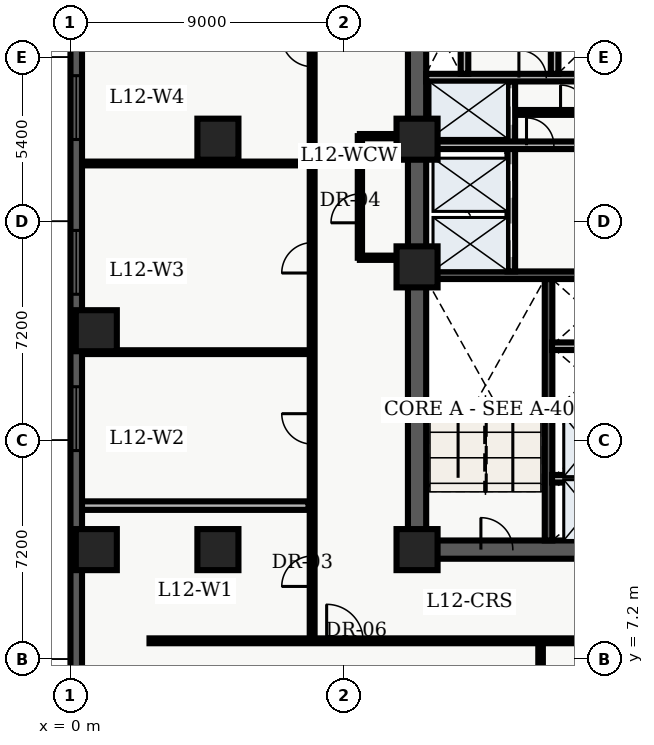
"""IFC4 building model, lengths in metres.
Left out: names, types, materials, properties, quantities, classifications, styles, units other than length and angle.
Written with IfcOpenShell. Run it as: python <this file> out.ifc"""

import sys

from ifc_helpers import new_model, entity, si_unit, converted_unit, direction, frame, origin_with_axes, origin_2d_with_axis, place, context, subcontext, project, spatial, polyline, rectangle, outline, extrude, element, fill, save


model = new_model("IFC4")
c1 = context("Model", 3, precision=1e-05, world=origin_with_axes(), true_north=direction((0.0, 1.0)))
c2 = subcontext(c1, "Body", "Model", "MODEL_VIEW")
j1 = project(units=[si_unit("LENGTHUNIT", "METRE"), converted_unit("PLANEANGLEUNIT", "DEGREE", entity("IfcPlaneAngleMeasure", 0.017), si_unit("PLANEANGLEUNIT", "RADIAN"), dimensions=[0, 0, 0, 0, 0, 0, 0])], contexts=[c1])
p1 = place(None, origin_with_axes())
s1 = spatial("IfcSite", under=j1, at=p1, CompositionType="ELEMENT")
p2 = place(p1, origin_with_axes())
s2 = spatial("IfcBuilding", under=s1, at=p2, CompositionType="ELEMENT")
p3 = place(p2, frame((0.0, 0.0, 52.2), z_axis=(0.0, 0.0, 1.0), x_axis=(1.0, 0.0, 0.0)))
s3 = spatial("IfcBuildingStorey", under=s2, at=p3, CompositionType="ELEMENT", Elevation=52.2)
p4 = place(p3, frame((11.4, 10.8, 0.0), z_axis=(0.0, 0.0, 1.0), x_axis=(0.0, 1.0, 0.0)))
e1 = element("IfcWall", 1, at=p4, inside=s3, PredefinedType="SHEAR", context=c2, shape_type="SweptSolid", body=[
    extrude(outline(polyline([(0.0, -0.3), (27.0, -0.3), (27.0, 0.3), (0.0, 0.3), (0.0, -0.3)])), origin_with_axes(), (0.0, 0.0, 1.0), 3.66),
])
p5 = place(p3, frame((11.4, 10.8, 0.0), z_axis=(0.0, 0.0, 1.0), x_axis=(1.0, 0.0, 0.0)))
e2 = element("IfcWall", 2, at=p5, inside=s3, PredefinedType="SHEAR", context=c2, shape_type="SweptSolid", body=[
    extrude(outline(polyline([(0.0, -0.3), (7.2, -0.3), (7.2, 0.3), (0.0, 0.3), (0.0, -0.3)])), origin_with_axes(), (0.0, 0.0, 1.0), 3.66),
])
p6 = place(p5, frame((2.625, 0.0, 0.0), z_axis=(0.0, 0.0, 1.0), x_axis=(1.0, 0.0, 0.0)))
e3 = element("IfcOpeningElement", 3, at=p6, cuts=e2, PredefinedType="OPENING", context=c2, shape_type="SweptSolid", body=[
    extrude(rectangle(XDim=1.05, YDim=0.62, at=origin_2d_with_axis()), origin_with_axes(), (0.0, 0.0, 1.0), 2.15),
])
p7 = place(p3, frame((15.725, 11.1, 0.0), z_axis=(0.0, 0.0, 1.0), x_axis=(0.0, 1.0, 0.0)))
e4 = element("IfcWall", 4, at=p7, inside=s3, PredefinedType="SHEAR", context=c2, shape_type="SweptSolid", body=[
    extrude(outline(polyline([(0.0, -0.125), (8.6, -0.125), (8.6, 0.125), (0.0, 0.125), (0.0, -0.125)])), origin_with_axes(), (0.0, 0.0, 1.0), 3.66),
])
p8 = place(p3, frame((11.7, 19.825, 0.0), z_axis=(0.0, 0.0, 1.0), x_axis=(1.0, 0.0, 0.0)))
e5 = element("IfcWall", 5, at=p8, inside=s3, PredefinedType="SHEAR", context=c2, shape_type="SweptSolid", body=[
    extrude(outline(polyline([(0.0, -0.125), (6.6, -0.125), (6.6, 0.125), (0.0, 0.125), (0.0, -0.125)])), origin_with_axes(), (0.0, 0.0, 1.0), 3.66),
])
p9 = place(p3, frame((14.5, 19.95, 0.0), z_axis=(0.0, 0.0, 1.0), x_axis=(0.0, 1.0, 0.0)))
e6 = element("IfcWall", 6, at=p9, inside=s3, PredefinedType="SOLIDWALL", context=c2, shape_type="SweptSolid", body=[
    extrude(outline(polyline([(0.0, -0.125), (6.25, -0.125), (6.25, 0.125), (0.0, 0.125), (0.0, -0.125)])), origin_with_axes(), (0.0, 0.0, 1.0), 2.7),
])
p10 = place(p9, frame((1.025, 0.0, 0.0), z_axis=(0.0, 0.0, 1.0), x_axis=(1.0, 0.0, 0.0)))
e7 = element("IfcOpeningElement", 7, at=p10, cuts=e6, PredefinedType="OPENING", context=c2, shape_type="SweptSolid", body=[
    extrude(rectangle(XDim=1.1, YDim=0.27, at=origin_2d_with_axis()), origin_with_axes(), (0.0, 0.0, 1.0), 2.15),
])
p11 = place(p9, frame((2.975, 0.0, 0.0), z_axis=(0.0, 0.0, 1.0), x_axis=(1.0, 0.0, 0.0)))
e8 = element("IfcOpeningElement", 8, at=p11, cuts=e6, PredefinedType="OPENING", context=c2, shape_type="SweptSolid", body=[
    extrude(rectangle(XDim=1.1, YDim=0.27, at=origin_2d_with_axis()), origin_with_axes(), (0.0, 0.0, 1.0), 2.15),
])
p12 = place(p9, frame((5.425, 0.0, 0.0), z_axis=(0.0, 0.0, 1.0), x_axis=(1.0, 0.0, 0.0)))
e9 = element("IfcOpeningElement", 9, at=p12, cuts=e6, PredefinedType="OPENING", context=c2, shape_type="SweptSolid", body=[
    extrude(rectangle(XDim=1.2, YDim=0.27, at=origin_2d_with_axis()), origin_with_axes(), (0.0, 0.0, 1.0), 2.15),
])
p13 = place(p3, frame((11.7, 24.1, 0.0), z_axis=(0.0, 0.0, 1.0), x_axis=(1.0, 0.0, 0.0)))
e10 = element("IfcWall", 10, at=p13, inside=s3, PredefinedType="SOLIDWALL", context=c2, shape_type="SweptSolid", body=[
    extrude(outline(polyline([(0.0, -0.125), (6.6, -0.125), (6.6, 0.125), (0.0, 0.125), (0.0, -0.125)])), origin_with_axes(), (0.0, 0.0, 1.0), 2.7),
])
p14 = place(p13, frame((3.75, 0.0, 0.0), z_axis=(0.0, 0.0, 1.0), x_axis=(1.0, 0.0, 0.0)))
e11 = element("IfcOpeningElement", 11, at=p14, cuts=e10, PredefinedType="OPENING", context=c2, shape_type="SweptSolid", body=[
    extrude(rectangle(XDim=0.9, YDim=0.27, at=origin_2d_with_axis()), origin_with_axes(), (0.0, 0.0, 1.0), 2.15),
])
p15 = place(p3, frame((11.7, 26.325, 0.0), z_axis=(0.0, 0.0, 1.0), x_axis=(1.0, 0.0, 0.0)))
e12 = element("IfcWall", 12, at=p15, inside=s3, PredefinedType="SOLIDWALL", context=c2, shape_type="SweptSolid", body=[
    extrude(outline(polyline([(0.0, -0.125), (6.6, -0.125), (6.6, 0.125), (0.0, 0.125), (0.0, -0.125)])), origin_with_axes(), (0.0, 0.0, 1.0), 2.7),
])
p16 = place(p15, frame((3.5, 0.0, 0.0), z_axis=(0.0, 0.0, 1.0), x_axis=(1.0, 0.0, 0.0)))
e13 = element("IfcOpeningElement", 13, at=p16, cuts=e12, PredefinedType="OPENING", context=c2, shape_type="SweptSolid", body=[
    extrude(rectangle(XDim=0.9, YDim=0.27, at=origin_2d_with_axis()), origin_with_axes(), (0.0, 0.0, 1.0), 2.15),
])
for number, where, z_axis, x_axis in (
    (14, (12.96, 26.45, 0.0), (0.0, 0.0, 1.0), (0.0, 1.0, 0.0)),
    (15, (15.925, 26.45, 0.0), (0.0, 0.0, 1.0), (0.0, 1.0, 0.0)),
):
    element("IfcWall", number, at=place(p3, frame(where, z_axis=z_axis, x_axis=x_axis)), inside=s3, PredefinedType="SOLIDWALL", context=c2, shape_type="SweptSolid", body=[
        extrude(outline(polyline([(0.0, -0.125), (2.2, -0.125), (2.2, 0.125), (0.0, 0.125), (0.0, -0.125)])), origin_with_axes(), (0.0, 0.0, 1.0), 2.7),
    ])
for number, where, z_axis, x_axis in (
    (16, (11.4, 10.8, 0.0), (0.0, 0.0, 1.0), (1.0, 0.0, 0.0)),
    (17, (11.4, 20.1, 0.0), (0.0, 0.0, 1.0), (1.0, 0.0, 0.0)),
    (18, (11.4, 24.3, 0.0), (0.0, 0.0, 1.0), (1.0, 0.0, 0.0)),
    (19, (4.85, 10.8, 0.0), (0.0, 0.0, 1.0), (1.0, 0.0, 0.0)),
    (20, (4.85, 24.3, 0.0), (0.0, 0.0, 1.0), (1.0, 0.0, 0.0)),
    (21, (0.85, 10.8, 0.0), (0.0, 0.0, 1.0), (1.0, 0.0, 0.0)),
    (22, (0.85, 18.0, 0.0), (0.0, 0.0, 1.0), (1.0, 0.0, 0.0)),
):
    element("IfcColumn", number, at=place(p3, frame(where, z_axis=z_axis, x_axis=x_axis)), inside=s3, PredefinedType="COLUMN", context=c2, shape_type="SweptSolid", body=[
        extrude(rectangle(XDim=1.35, YDim=1.35, at=origin_2d_with_axis()), origin_with_axes(), (0.0, 0.0, 1.0), 3.9),
    ])
p17 = place(p3, frame((14.62, 25.18, 0.0), z_axis=(0.0, 0.0, 1.0), x_axis=(1.0, 0.0, 0.0)))
e23 = element("IfcWall", 23, at=p17, inside=s3, PredefinedType="PARTITIONING", context=c2, shape_type="SweptSolid", body=[
    extrude(outline(polyline([(0.0, -0.08), (3.68, -0.08), (3.68, 0.08), (0.0, 0.08), (0.0, -0.08)])), origin_with_axes(), (0.0, 0.0, 1.0), 2.7),
])
p18 = place(p17, frame((1.95, 0.0, 0.0), z_axis=(0.0, 0.0, 1.0), x_axis=(1.0, 0.0, 0.0)))
e24 = element("IfcOpeningElement", 24, at=p18, cuts=e23, PredefinedType="OPENING", context=c2, shape_type="SweptSolid", body=[
    extrude(rectangle(XDim=0.9, YDim=0.18, at=origin_2d_with_axis()), origin_with_axes(), (0.0, 0.0, 1.0), 2.15),
])
for number, where, z_axis, x_axis in (
    (25, (15.84, 13.13, 0.0), (0.0, 0.0, 1.0), (1.0, 0.0, 0.0)),
    (26, (15.84, 15.29, 0.0), (0.0, 0.0, 1.0), (1.0, 0.0, 0.0)),
    (27, (15.84, 17.49, 0.0), (0.0, 0.0, 1.0), (1.0, 0.0, 0.0)),
):
    element("IfcWall", number, at=place(p3, frame(where, z_axis=z_axis, x_axis=x_axis)), inside=s3, PredefinedType="SOLIDWALL", context=c2, shape_type="SweptSolid", body=[
        extrude(outline(polyline([(0.0, -0.125), (2.46, -0.125), (2.46, 0.125), (0.0, 0.125), (0.0, -0.125)])), origin_with_axes(), (0.0, 0.0, 1.0), 2.7),
    ])
p19 = place(p3, frame((9.52, 20.4, 0.0), z_axis=(0.0, 0.0, 1.0), x_axis=(0.0, 1.0, 0.0)))
e28 = element("IfcWall", 28, at=p19, inside=s3, PredefinedType="PARTITIONING", context=c2, shape_type="SweptSolid", body=[
    extrude(outline(polyline([(0.0, -0.07), (4.0, -0.07), (4.0, 0.07), (0.0, 0.07), (0.0, -0.07)])), origin_with_axes(), (0.0, 0.0, 1.0), 2.7),
])
p20 = place(p19, frame((1.625, 0.0, 0.0), z_axis=(0.0, 0.0, 1.0), x_axis=(1.0, 0.0, 0.0)))
e29 = element("IfcOpeningElement", 29, at=p20, cuts=e28, PredefinedType="OPENING", context=c2, shape_type="SweptSolid", body=[
    extrude(rectangle(XDim=0.95, YDim=0.16, at=origin_2d_with_axis()), origin_with_axes(), (0.0, 0.0, 1.0), 2.15),
])
for number, where, z_axis, x_axis in (
    (30, (9.52, 20.4, 0.0), (0.0, 0.0, 1.0), (1.0, 0.0, 0.0)),
    (31, (9.52, 24.4, 0.0), (0.0, 0.0, 1.0), (1.0, 0.0, 0.0)),
):
    element("IfcWall", number, at=place(p3, frame(where, z_axis=z_axis, x_axis=x_axis)), inside=s3, PredefinedType="PARTITIONING", context=c2, shape_type="SweptSolid", body=[
        extrude(outline(polyline([(0.0, -0.07), (1.58, -0.07), (1.58, 0.07), (0.0, 0.07), (0.0, -0.07)])), origin_with_axes(), (0.0, 0.0, 1.0), 2.7),
    ])
p21 = place(p3, frame((2.6, 7.8, 0.0), z_axis=(0.0, 0.0, 1.0), x_axis=(1.0, 0.0, 0.0)))
e32 = element("IfcWall", 32, at=p21, inside=s3, PredefinedType="PARTITIONING", context=c2, shape_type="SweptSolid", body=[
    extrude(outline(polyline([(0.0, -0.08), (18.55, -0.08), (18.55, 0.08), (0.0, 0.08), (0.0, -0.08)])), origin_with_axes(), (0.0, 0.0, 1.0), 2.7),
])
p22 = place(p21, frame((6.426, 0.0, 0.0), z_axis=(0.0, 0.0, 1.0), x_axis=(1.0, 0.0, 0.0)))
e33 = element("IfcOpeningElement", 33, at=p22, cuts=e32, PredefinedType="OPENING", context=c2, shape_type="SweptSolid", body=[
    extrude(rectangle(XDim=1.2, YDim=0.18, at=origin_2d_with_axis()), origin_with_axes(), (0.0, 0.0, 1.0), 2.2),
])
p23 = place(p21, frame((15.681, 0.0, 0.0), z_axis=(0.0, 0.0, 1.0), x_axis=(1.0, 0.0, 0.0)))
e34 = element("IfcOpeningElement", 34, at=p23, cuts=e32, PredefinedType="OPENING", context=c2, shape_type="SweptSolid", body=[
    extrude(rectangle(XDim=1.0, YDim=0.18, at=origin_2d_with_axis()), origin_with_axes(), (0.0, 0.0, 1.0), 2.15),
])
p24 = place(p3, frame((7.95, 7.8, 0.0), z_axis=(0.0, 0.0, 1.0), x_axis=(0.0, 1.0, 0.0)))
e35 = element("IfcWall", 35, at=p24, inside=s3, PredefinedType="PARTITIONING", context=c2, shape_type="SweptSolid", body=[
    extrude(outline(polyline([(0.0, -0.08), (32.7, -0.08), (32.7, 0.08), (0.0, 0.08), (0.0, -0.08)])), origin_with_axes(), (0.0, 0.0, 1.0), 2.7),
])
p25 = place(p24, frame((2.288, 0.0, 0.0), z_axis=(0.0, 0.0, 1.0), x_axis=(1.0, 0.0, 0.0)))
e36 = element("IfcOpeningElement", 36, at=p25, cuts=e35, PredefinedType="OPENING", context=c2, shape_type="SweptSolid", body=[
    extrude(rectangle(XDim=1.0, YDim=0.18, at=origin_2d_with_axis()), origin_with_axes(), (0.0, 0.0, 1.0), 2.15),
])
p26 = place(p24, frame((6.971, 0.0, 0.0), z_axis=(0.0, 0.0, 1.0), x_axis=(1.0, 0.0, 0.0)))
e37 = element("IfcOpeningElement", 37, at=p26, cuts=e35, PredefinedType="OPENING", context=c2, shape_type="SweptSolid", body=[
    extrude(rectangle(XDim=1.0, YDim=0.18, at=origin_2d_with_axis()), origin_with_axes(), (0.0, 0.0, 1.0), 2.15),
])
p27 = place(p24, frame((12.598, 0.0, 0.0), z_axis=(0.0, 0.0, 1.0), x_axis=(1.0, 0.0, 0.0)))
e38 = element("IfcOpeningElement", 38, at=p27, cuts=e35, PredefinedType="OPENING", context=c2, shape_type="SweptSolid", body=[
    extrude(rectangle(XDim=1.0, YDim=0.18, at=origin_2d_with_axis()), origin_with_axes(), (0.0, 0.0, 1.0), 2.15),
])
p28 = place(p24, frame((19.386, 0.0, 0.0), z_axis=(0.0, 0.0, 1.0), x_axis=(1.0, 0.0, 0.0)))
e39 = element("IfcOpeningElement", 39, at=p28, cuts=e35, PredefinedType="OPENING", context=c2, shape_type="SweptSolid", body=[
    extrude(rectangle(XDim=1.0, YDim=0.18, at=origin_2d_with_axis()), origin_with_axes(), (0.0, 0.0, 1.0), 2.15),
])
p29 = place(p24, frame((27.82, 0.0, 0.0), z_axis=(0.0, 0.0, 1.0), x_axis=(1.0, 0.0, 0.0)))
e40 = element("IfcOpeningElement", 40, at=p29, cuts=e35, PredefinedType="OPENING", context=c2, shape_type="SweptSolid", body=[
    extrude(rectangle(XDim=1.0, YDim=0.18, at=origin_2d_with_axis()), origin_with_axes(), (0.0, 0.0, 1.0), 2.15),
])
p30 = place(p3, frame((0.375, 12.247, 0.0), z_axis=(0.0, 0.0, 1.0), x_axis=(1.0, 0.0, 0.0)))
e41 = element("IfcWall", 41, at=p30, inside=s3, PredefinedType="PARTITIONING", context=c2, shape_type="SweptSolid", body=[
    extrude(outline(polyline([(0.0, -0.14), (7.455, -0.14), (7.455, 0.14), (0.0, 0.14), (0.0, -0.14)])), origin_with_axes(), (0.0, 0.0, 1.0), 2.7),
])
for number, where, z_axis, x_axis in (
    (42, (0.375, 17.295, 0.0), (0.0, 0.0, 1.0), (1.0, 0.0, 0.0)),
    (43, (0.375, 23.501, 0.0), (0.0, 0.0, 1.0), (1.0, 0.0, 0.0)),
):
    element("IfcWall", number, at=place(p3, frame(where, z_axis=z_axis, x_axis=x_axis)), inside=s3, PredefinedType="PARTITIONING", context=c2, shape_type="SweptSolid", body=[
        extrude(outline(polyline([(0.0, -0.062), (7.455, -0.062), (7.455, 0.062), (0.0, 0.062), (0.0, -0.062)])), origin_with_axes(), (0.0, 0.0, 1.0), 2.7),
    ])
p31 = place(p3, frame((15.463, 0.36, 0.0), z_axis=(0.0, 0.0, 1.0), x_axis=(0.0, 1.0, 0.0)))
e44 = element("IfcWall", 44, at=p31, inside=s3, PredefinedType="PARTITIONING", context=c2, shape_type="SweptSolid", body=[
    extrude(outline(polyline([(0.0, -0.075), (7.34, -0.075), (7.34, 0.075), (0.0, 0.075), (0.0, -0.075)])), origin_with_axes(), (0.0, 0.0, 1.0), 2.7),
])
p32 = place(p3, frame((0.19, 2.78, 0.0), z_axis=(0.0, 0.0, 1.0), x_axis=(0.0, 1.0, 0.0)))
e45 = element("IfcWall", 45, at=p32, inside=s3, PredefinedType="SOLIDWALL", context=c2, shape_type="SweptSolid", body=[
    extrude(outline(polyline([(0.0, -0.19), (43.42, -0.19), (43.42, 0.19), (0.0, 0.19), (0.0, -0.19)])), origin_with_axes(), (0.0, 0.0, 1.0), 3.66),
])
p33 = place(p32, frame((2.946, 0.0, 0.45), z_axis=(0.0, 0.0, 1.0), x_axis=(1.0, 0.0, 0.0)))
e46 = element("IfcOpeningElement", 46, at=p33, cuts=e45, PredefinedType="OPENING", context=c2, shape_type="SweptSolid", body=[
    extrude(rectangle(XDim=2.1, YDim=0.4, at=origin_2d_with_axis()), origin_with_axes(), (0.0, 0.0, 1.0), 2.2),
])
p34 = place(p32, frame((12.328, 0.0, 0.45), z_axis=(0.0, 0.0, 1.0), x_axis=(1.0, 0.0, 0.0)))
e47 = element("IfcOpeningElement", 47, at=p34, cuts=e45, PredefinedType="OPENING", context=c2, shape_type="SweptSolid", body=[
    extrude(rectangle(XDim=2.1, YDim=0.4, at=origin_2d_with_axis()), origin_with_axes(), (0.0, 0.0, 1.0), 2.2),
])
p35 = place(p32, frame((17.469, 0.0, 0.45), z_axis=(0.0, 0.0, 1.0), x_axis=(1.0, 0.0, 0.0)))
e48 = element("IfcOpeningElement", 48, at=p35, cuts=e45, PredefinedType="OPENING", context=c2, shape_type="SweptSolid", body=[
    extrude(rectangle(XDim=2.1, YDim=0.4, at=origin_2d_with_axis()), origin_with_axes(), (0.0, 0.0, 1.0), 2.2),
])
p36 = place(p32, frame((22.56, 0.0, 0.45), z_axis=(0.0, 0.0, 1.0), x_axis=(1.0, 0.0, 0.0)))
e49 = element("IfcOpeningElement", 49, at=p36, cuts=e45, PredefinedType="OPENING", context=c2, shape_type="SweptSolid", body=[
    extrude(rectangle(XDim=2.1, YDim=0.4, at=origin_2d_with_axis()), origin_with_axes(), (0.0, 0.0, 1.0), 2.2),
])
p37 = place(p32, frame((26.401, 0.0, 0.45), z_axis=(0.0, 0.0, 1.0), x_axis=(1.0, 0.0, 0.0)))
e50 = element("IfcOpeningElement", 50, at=p37, cuts=e45, PredefinedType="OPENING", context=c2, shape_type="SweptSolid", body=[
    extrude(rectangle(XDim=2.1, YDim=0.4, at=origin_2d_with_axis()), origin_with_axes(), (0.0, 0.0, 1.0), 2.2),
])
p38 = place(p32, frame((31.092, 0.0, 0.45), z_axis=(0.0, 0.0, 1.0), x_axis=(1.0, 0.0, 0.0)))
e51 = element("IfcOpeningElement", 51, at=p38, cuts=e45, PredefinedType="OPENING", context=c2, shape_type="SweptSolid", body=[
    extrude(rectangle(XDim=2.1, YDim=0.4, at=origin_2d_with_axis()), origin_with_axes(), (0.0, 0.0, 1.0), 2.2),
])
p39 = place(p32, frame((40.024, 0.0, 0.45), z_axis=(0.0, 0.0, 1.0), x_axis=(1.0, 0.0, 0.0)))
e52 = element("IfcOpeningElement", 52, at=p39, cuts=e45, PredefinedType="OPENING", context=c2, shape_type="SweptSolid", body=[
    extrude(rectangle(XDim=2.1, YDim=0.4, at=origin_2d_with_axis()), origin_with_axes(), (0.0, 0.0, 1.0), 2.2),
])
p40 = place(p9, frame((1.025, 0.0, 0.0), z_axis=(0.0, 0.0, 1.0), x_axis=(1.0, 0.0, 0.0)))
e53 = element("IfcDoor", 53, at=p40, inside=s3, OperationType="SLIDING_TO_LEFT", PredefinedType="DOOR", context=c2, shape_type="SweptSolid", body=[
    extrude(rectangle(XDim=1.1, YDim=0.09, at=origin_2d_with_axis()), origin_with_axes(), (0.0, 0.0, 1.0), 2.15),
])
fill(e7, e53)
p41 = place(p9, frame((2.975, 0.0, 0.0), z_axis=(0.0, 0.0, 1.0), x_axis=(1.0, 0.0, 0.0)))
e54 = element("IfcDoor", 54, at=p41, inside=s3, OperationType="SLIDING_TO_RIGHT", PredefinedType="DOOR", context=c2, shape_type="SweptSolid", body=[
    extrude(rectangle(XDim=1.1, YDim=0.09, at=origin_2d_with_axis()), origin_with_axes(), (0.0, 0.0, 1.0), 2.15),
])
fill(e8, e54)
p42 = place(p9, frame((5.425, 0.0, 0.0), z_axis=(0.0, 0.0, 1.0), x_axis=(1.0, 0.0, 0.0)))
e55 = element("IfcDoor", 55, at=p42, inside=s3, OperationType="DOUBLE_DOOR_SLIDING", PredefinedType="DOOR", context=c2, shape_type="SweptSolid", body=[
    extrude(rectangle(XDim=1.2, YDim=0.09, at=origin_2d_with_axis()), origin_with_axes(), (0.0, 0.0, 1.0), 2.15),
])
fill(e9, e55)
p43 = place(p5, frame((2.625, 0.0, 0.0), z_axis=(0.0, 0.0, 1.0), x_axis=(1.0, 0.0, 0.0)))
e56 = element("IfcDoor", 56, at=p43, inside=s3, OperationType="SINGLE_SWING_LEFT", PredefinedType="DOOR", context=c2, shape_type="SweptSolid", body=[
    extrude(rectangle(XDim=1.05, YDim=0.09, at=origin_2d_with_axis()), origin_with_axes(), (0.0, 0.0, 1.0), 2.15),
])
fill(e3, e56)
p44 = place(p15, frame((3.5, 0.0, 0.0), z_axis=(0.0, 0.0, 1.0), x_axis=(1.0, 0.0, 0.0)))
e57 = element("IfcDoor", 57, at=p44, inside=s3, OperationType="SINGLE_SWING_LEFT", PredefinedType="DOOR", context=c2, shape_type="SweptSolid", body=[
    extrude(rectangle(XDim=0.9, YDim=0.09, at=origin_2d_with_axis()), origin_with_axes(), (0.0, 0.0, 1.0), 2.15),
])
fill(e13, e57)
p45 = place(p13, frame((3.75, 0.0, 0.0), z_axis=(0.0, 0.0, 1.0), x_axis=(1.0, 0.0, 0.0)))
e58 = element("IfcDoor", 58, at=p45, inside=s3, OperationType="SINGLE_SWING_LEFT", PredefinedType="DOOR", context=c2, shape_type="SweptSolid", body=[
    extrude(rectangle(XDim=0.9, YDim=0.09, at=origin_2d_with_axis()), origin_with_axes(), (0.0, 0.0, 1.0), 2.15),
])
fill(e11, e58)
p46 = place(p17, frame((1.95, 0.0, 0.0), z_axis=(0.0, 0.0, 1.0), x_axis=(1.0, 0.0, 0.0)))
e59 = element("IfcDoor", 59, at=p46, inside=s3, OperationType="SINGLE_SWING_LEFT", PredefinedType="DOOR", context=c2, shape_type="SweptSolid", body=[
    extrude(rectangle(XDim=0.9, YDim=0.09, at=origin_2d_with_axis()), origin_with_axes(), (0.0, 0.0, 1.0), 2.15),
])
fill(e24, e59)
p47 = place(p19, frame((1.625, 0.0, 0.0), z_axis=(0.0, 0.0, 1.0), x_axis=(1.0, 0.0, 0.0)))
e60 = element("IfcDoor", 60, at=p47, inside=s3, OperationType="SINGLE_SWING_LEFT", PredefinedType="DOOR", context=c2, shape_type="SweptSolid", body=[
    extrude(rectangle(XDim=0.95, YDim=0.084, at=origin_2d_with_axis()), origin_with_axes(), (0.0, 0.0, 1.0), 2.15),
])
fill(e29, e60)
p48 = place(p24, frame((2.288, 0.0, 0.0), z_axis=(0.0, 0.0, 1.0), x_axis=(1.0, 0.0, 0.0)))
e61 = element("IfcDoor", 61, at=p48, inside=s3, OperationType="SINGLE_SWING_LEFT", PredefinedType="DOOR", context=c2, shape_type="SweptSolid", body=[
    extrude(rectangle(XDim=1.0, YDim=0.09, at=origin_2d_with_axis()), origin_with_axes(), (0.0, 0.0, 1.0), 2.15),
])
fill(e36, e61)
p49 = place(p24, frame((6.971, 0.0, 0.0), z_axis=(0.0, 0.0, 1.0), x_axis=(1.0, 0.0, 0.0)))
e62 = element("IfcDoor", 62, at=p49, inside=s3, OperationType="SINGLE_SWING_RIGHT", PredefinedType="DOOR", context=c2, shape_type="SweptSolid", body=[
    extrude(rectangle(XDim=1.0, YDim=0.09, at=origin_2d_with_axis()), origin_with_axes(), (0.0, 0.0, 1.0), 2.15),
])
fill(e37, e62)
p50 = place(p24, frame((12.598, 0.0, 0.0), z_axis=(0.0, 0.0, 1.0), x_axis=(1.0, 0.0, 0.0)))
e63 = element("IfcDoor", 63, at=p50, inside=s3, OperationType="SINGLE_SWING_LEFT", PredefinedType="DOOR", context=c2, shape_type="SweptSolid", body=[
    extrude(rectangle(XDim=1.0, YDim=0.09, at=origin_2d_with_axis()), origin_with_axes(), (0.0, 0.0, 1.0), 2.15),
])
fill(e38, e63)
p51 = place(p24, frame((19.386, 0.0, 0.0), z_axis=(0.0, 0.0, 1.0), x_axis=(1.0, 0.0, 0.0)))
e64 = element("IfcDoor", 64, at=p51, inside=s3, OperationType="SINGLE_SWING_RIGHT", PredefinedType="DOOR", context=c2, shape_type="SweptSolid", body=[
    extrude(rectangle(XDim=1.0, YDim=0.09, at=origin_2d_with_axis()), origin_with_axes(), (0.0, 0.0, 1.0), 2.15),
])
fill(e39, e64)
p52 = place(p21, frame((6.426, 0.0, 0.0), z_axis=(0.0, 0.0, 1.0), x_axis=(1.0, 0.0, 0.0)))
e65 = element("IfcDoor", 65, at=p52, inside=s3, OperationType="SINGLE_SWING_LEFT", PredefinedType="DOOR", context=c2, shape_type="SweptSolid", body=[
    extrude(rectangle(XDim=1.2, YDim=0.09, at=origin_2d_with_axis()), origin_with_axes(), (0.0, 0.0, 1.0), 2.2),
])
fill(e33, e65)
p53 = place(p32, frame((12.328, 0.0, 0.45), z_axis=(0.0, 0.0, 1.0), x_axis=(1.0, 0.0, 0.0)))
e66 = element("IfcWindow", 66, at=p53, inside=s3, PredefinedType="WINDOW", context=c2, shape_type="SweptSolid", body=[
    extrude(rectangle(XDim=2.1, YDim=0.09, at=origin_2d_with_axis()), origin_with_axes(), (0.0, 0.0, 1.0), 2.2),
])
fill(e47, e66)
p54 = place(p32, frame((17.469, 0.0, 0.45), z_axis=(0.0, 0.0, 1.0), x_axis=(1.0, 0.0, 0.0)))
e67 = element("IfcWindow", 67, at=p54, inside=s3, PredefinedType="WINDOW", context=c2, shape_type="SweptSolid", body=[
    extrude(rectangle(XDim=2.1, YDim=0.09, at=origin_2d_with_axis()), origin_with_axes(), (0.0, 0.0, 1.0), 2.2),
])
fill(e48, e67)
p55 = place(p32, frame((22.56, 0.0, 0.45), z_axis=(0.0, 0.0, 1.0), x_axis=(1.0, 0.0, 0.0)))
e68 = element("IfcWindow", 68, at=p55, inside=s3, PredefinedType="WINDOW", context=c2, shape_type="SweptSolid", body=[
    extrude(rectangle(XDim=2.1, YDim=0.09, at=origin_2d_with_axis()), origin_with_axes(), (0.0, 0.0, 1.0), 2.2),
])
fill(e49, e68)
save(model, sys.argv[1])
